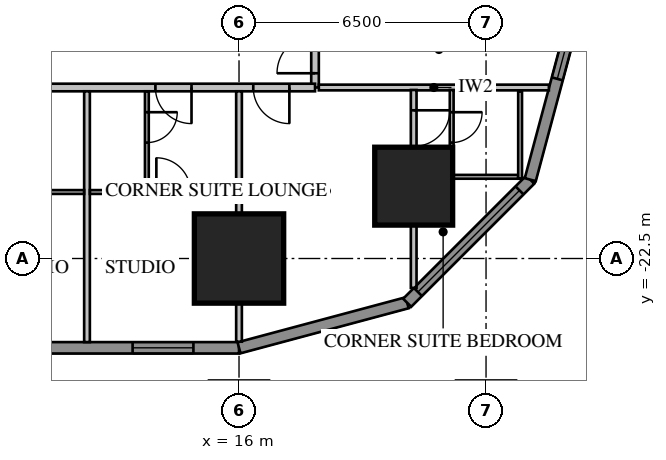
"""IFC4 building model, lengths in metres.
Left out: names, types, materials, properties, quantities, classifications, styles, units other than length and angle.
Written with IfcOpenShell. Run it as: python <this file> out.ifc"""

import sys

from ifc_helpers import new_model, si_unit, direction, frame, frame_2d, origin, origin_2d, place, context, subcontext, project, spatial, rectangle, extrude, element, fill, save


model = new_model("IFC4")
c1 = context("Model", 3, precision=1e-05, world=origin(), true_north=direction((0.0, 1.0)))
c2 = subcontext(c1, "Body", "Model", "MODEL_VIEW")
j1 = project(units=[si_unit("LENGTHUNIT", "METRE"), si_unit("PLANEANGLEUNIT", "RADIAN")], contexts=[c1])
p1 = place(None, origin())
s1 = spatial("IfcSite", under=j1, at=p1, CompositionType="ELEMENT")
p2 = place(p1, origin())
s2 = spatial("IfcBuilding", under=s1, at=p2, CompositionType="ELEMENT")
p3 = place(p2, frame((0.0, 0.0, 19.85)))
s3 = spatial("IfcBuildingStorey", under=s2, at=p3, CompositionType="ELEMENT", Elevation=19.85)
p4 = place(p3, frame((16.0, -22.5, 0.0), z_axis=(0.0, 0.0, 1.0), x_axis=(1.0, 0.0, 0.0)))
e1 = element("IfcColumn", 1, at=p4, inside=s3, PredefinedType="COLUMN", context=c2, shape_type="SweptSolid", body=[
    extrude(rectangle(XDim=2.35, YDim=2.35, at=origin_2d()), origin(), (0.0, 0.0, 1.0), 3.85),
])
p5 = place(p3, frame((20.596, -20.596, 0.0), z_axis=(0.0, 0.0, 1.0), x_axis=(1.0, 0.0, 0.0)))
e2 = element("IfcColumn", 2, at=p5, inside=s3, PredefinedType="COLUMN", context=c2, shape_type="SweptSolid", body=[
    extrude(rectangle(XDim=2.05, YDim=2.05, at=origin_2d()), origin(), (0.0, 0.0, 1.0), 3.85),
])
p6 = place(p3, frame((-16.0, -24.85, 0.0), z_axis=(0.0, 0.0, 1.0), x_axis=(1.0, 0.0, 0.0)))
e3 = element("IfcWall", 3, at=p6, inside=s3, PredefinedType="SOLIDWALL", context=c2, shape_type="SweptSolid", body=[
    extrude(rectangle(XDim=32.0, YDim=0.3, at=frame_2d((16.0, 0.0))), origin(), (0.0, 0.0, 1.0), 3.65),
])
p7 = place(p6, frame((1.2, 0.0, 0.75)))
e4 = element("IfcOpeningElement", 4, at=p7, cuts=e3, PredefinedType="OPENING", context=c2, shape_type="SweptSolid", body=[
    extrude(rectangle(XDim=1.6, YDim=1.8, at=frame_2d((0.8, 0.9))), frame((0.0, 0.17, 0.0), z_axis=(0.0, -1.0, 0.0), x_axis=(1.0, 0.0, 0.0)), (0.0, 0.0, 1.0), 0.34),
])
p8 = place(p6, frame((5.2, 0.0, 0.75)))
e5 = element("IfcOpeningElement", 5, at=p8, cuts=e3, PredefinedType="OPENING", context=c2, shape_type="SweptSolid", body=[
    extrude(rectangle(XDim=1.6, YDim=1.8, at=frame_2d((0.8, 0.9))), frame((0.0, 0.17, 0.0), z_axis=(0.0, -1.0, 0.0), x_axis=(1.0, 0.0, 0.0)), (0.0, 0.0, 1.0), 0.34),
])
p9 = place(p6, frame((17.2, 0.0, 0.75)))
e6 = element("IfcOpeningElement", 6, at=p9, cuts=e3, PredefinedType="OPENING", context=c2, shape_type="SweptSolid", body=[
    extrude(rectangle(XDim=1.6, YDim=1.8, at=frame_2d((0.8, 0.9))), frame((0.0, 0.17, 0.0), z_axis=(0.0, -1.0, 0.0), x_axis=(1.0, 0.0, 0.0)), (0.0, 0.0, 1.0), 0.34),
])
p10 = place(p6, frame((21.2, 0.0, 0.75)))
e7 = element("IfcOpeningElement", 7, at=p10, cuts=e3, PredefinedType="OPENING", context=c2, shape_type="SweptSolid", body=[
    extrude(rectangle(XDim=1.6, YDim=1.8, at=frame_2d((0.8, 0.9))), frame((0.0, 0.17, 0.0), z_axis=(0.0, -1.0, 0.0), x_axis=(1.0, 0.0, 0.0)), (0.0, 0.0, 1.0), 0.34),
])
p11 = place(p6, frame((25.2, 0.0, 0.75)))
e8 = element("IfcOpeningElement", 8, at=p11, cuts=e3, PredefinedType="OPENING", context=c2, shape_type="SweptSolid", body=[
    extrude(rectangle(XDim=1.6, YDim=1.8, at=frame_2d((0.8, 0.9))), frame((0.0, 0.17, 0.0), z_axis=(0.0, -1.0, 0.0), x_axis=(1.0, 0.0, 0.0)), (0.0, 0.0, 1.0), 0.34),
])
p12 = place(p6, frame((29.2, 0.0, 0.75)))
e9 = element("IfcOpeningElement", 9, at=p12, cuts=e3, PredefinedType="OPENING", context=c2, shape_type="SweptSolid", body=[
    extrude(rectangle(XDim=1.6, YDim=1.8, at=frame_2d((0.8, 0.9))), frame((0.0, 0.17, 0.0), z_axis=(0.0, -1.0, 0.0), x_axis=(1.0, 0.0, 0.0)), (0.0, 0.0, 1.0), 0.34),
])
p13 = place(p6, frame((8.8, 0.0, 0.75)))
e10 = element("IfcOpeningElement", 10, at=p13, cuts=e3, PredefinedType="OPENING", context=c2, shape_type="SweptSolid", body=[
    extrude(rectangle(XDim=2.4, YDim=1.8, at=frame_2d((1.2, 0.9))), frame((0.0, 0.17, 0.0), z_axis=(0.0, -1.0, 0.0), x_axis=(1.0, 0.0, 0.0)), (0.0, 0.0, 1.0), 0.34),
])
p14 = place(p6, frame((13.812, 0.0, 0.0)))
e11 = element("IfcOpeningElement", 11, at=p14, cuts=e3, PredefinedType="OPENING", context=c2, shape_type="SweptSolid", body=[
    extrude(rectangle(XDim=1.0, YDim=2.4, at=frame_2d((0.5, 1.2))), frame((0.0, 0.17, 0.0), z_axis=(0.0, -1.0, 0.0), x_axis=(1.0, 0.0, 0.0)), (0.0, 0.0, 1.0), 0.34),
])
p15 = place(p3, frame((16.0, -24.85, 0.0), z_axis=(0.0, 0.0, 1.0), x_axis=(0.965920218567, 0.258839972501, 0.0)))
e12 = element("IfcWall", 12, at=p15, inside=s3, PredefinedType="SOLIDWALL", context=c2, shape_type="SweptSolid", body=[
    extrude(rectangle(XDim=4.581, YDim=0.3, at=frame_2d((2.291, 0.0))), origin(), (0.0, 0.0, 1.0), 3.65),
])
p16 = place(p3, frame((20.425, -23.664, 0.0), z_axis=(0.0, 0.0, 1.0), x_axis=(0.707106781187, 0.707106781187, 0.0)))
e13 = element("IfcWall", 13, at=p16, inside=s3, PredefinedType="SOLIDWALL", context=c2, shape_type="SweptSolid", body=[
    extrude(rectangle(XDim=4.581, YDim=0.3, at=frame_2d((2.291, 0.0))), origin(), (0.0, 0.0, 1.0), 3.65),
])
p17 = place(p16, frame((0.4, 0.0, 0.75)))
e14 = element("IfcOpeningElement", 14, at=p17, cuts=e13, PredefinedType="OPENING", context=c2, shape_type="SweptSolid", body=[
    extrude(rectangle(XDim=3.781, YDim=1.8, at=frame_2d((1.891, 0.9))), frame((0.0, 0.17, 0.0), z_axis=(0.0, -1.0, 0.0), x_axis=(1.0, 0.0, 0.0)), (0.0, 0.0, 1.0), 0.34),
])
p18 = place(p3, frame((23.664, -20.425, 0.0), z_axis=(0.0, 0.0, 1.0), x_axis=(0.258839972501, 0.965920218567, 0.0)))
e15 = element("IfcWall", 15, at=p18, inside=s3, PredefinedType="SOLIDWALL", context=c2, shape_type="SweptSolid", body=[
    extrude(rectangle(XDim=4.581, YDim=0.3, at=frame_2d((2.291, 0.0))), origin(), (0.0, 0.0, 1.0), 3.65),
])
p19 = place(p18, frame((2.746, 0.0, 0.75)))
e16 = element("IfcOpeningElement", 16, at=p19, cuts=e15, PredefinedType="OPENING", context=c2, shape_type="SweptSolid", body=[
    extrude(rectangle(XDim=1.6, YDim=1.8, at=frame_2d((0.8, 0.9))), frame((0.0, 0.17, 0.0), z_axis=(0.0, -1.0, 0.0), x_axis=(1.0, 0.0, 0.0)), (0.0, 0.0, 1.0), 0.34),
])
p20 = place(p3, frame((18.0, -18.0, 0.0), z_axis=(0.0, 0.0, 1.0), x_axis=(0.0, 1.0, 0.0)))
e17 = element("IfcWall", 17, at=p20, inside=s3, PredefinedType="PARTITIONING", context=c2, shape_type="SweptSolid", body=[
    extrude(rectangle(XDim=36.0, YDim=0.2, at=frame_2d((18.0, 0.0))), origin(), (0.0, 0.0, 1.0), 3.65),
])
p21 = place(p20, frame((10.4, 0.0, 0.0)))
e18 = element("IfcOpeningElement", 18, at=p21, cuts=e17, PredefinedType="OPENING", context=c2, shape_type="SweptSolid", body=[
    extrude(rectangle(XDim=1.0, YDim=2.1, at=frame_2d((0.5, 1.05))), frame((0.0, 0.12, 0.0), z_axis=(0.0, -1.0, 0.0), x_axis=(1.0, 0.0, 0.0)), (0.0, 0.0, 1.0), 0.24),
])
p22 = place(p20, frame((0.375, 0.0, 0.0)))
e19 = element("IfcOpeningElement", 19, at=p22, cuts=e17, PredefinedType="OPENING", context=c2, shape_type="SweptSolid", body=[
    extrude(rectangle(XDim=1.0, YDim=2.1, at=frame_2d((0.5, 1.05))), frame((0.0, 0.12, 0.0), z_axis=(0.0, -1.0, 0.0), x_axis=(1.0, 0.0, 0.0)), (0.0, 0.0, 1.0), 0.24),
])
p23 = place(p20, frame((34.375, 0.0, 0.0)))
e20 = element("IfcOpeningElement", 20, at=p23, cuts=e17, PredefinedType="OPENING", context=c2, shape_type="SweptSolid", body=[
    extrude(rectangle(XDim=0.95, YDim=2.1, at=frame_2d((0.475, 1.05))), frame((0.0, 0.12, 0.0), z_axis=(0.0, -1.0, 0.0), x_axis=(1.0, 0.0, 0.0)), (0.0, 0.0, 1.0), 0.24),
])
p24 = place(p3, frame((18.1, -18.0, 0.0), z_axis=(0.0, 0.0, 1.0), x_axis=(1.0, 0.0, 0.0)))
e21 = element("IfcWall", 21, at=p24, inside=s3, PredefinedType="PARTITIONING", context=c2, shape_type="SweptSolid", body=[
    extrude(rectangle(XDim=6.053, YDim=0.15, at=frame_2d((3.027, 0.0))), origin(), (0.0, 0.0, 1.0), 3.65),
])
p25 = place(p3, frame((-18.0, -18.0, 0.0), z_axis=(0.0, 0.0, 1.0), x_axis=(1.0, 0.0, 0.0)))
e22 = element("IfcWall", 22, at=p25, inside=s3, PredefinedType="PARTITIONING", context=c2, shape_type="SweptSolid", body=[
    extrude(rectangle(XDim=36.0, YDim=0.2, at=frame_2d((18.0, 0.0))), origin(), (0.0, 0.0, 1.0), 3.65),
])
p26 = place(p25, frame((0.375, 0.0, 0.0)))
e23 = element("IfcOpeningElement", 23, at=p26, cuts=e22, PredefinedType="OPENING", context=c2, shape_type="SweptSolid", body=[
    extrude(rectangle(XDim=1.0, YDim=2.1, at=frame_2d((0.5, 1.05))), frame((0.0, 0.12, 0.0), z_axis=(0.0, -1.0, 0.0), x_axis=(1.0, 0.0, 0.0)), (0.0, 0.0, 1.0), 0.24),
])
p27 = place(p25, frame((2.45, 0.0, 0.0)))
e24 = element("IfcOpeningElement", 24, at=p27, cuts=e22, PredefinedType="OPENING", context=c2, shape_type="SweptSolid", body=[
    extrude(rectangle(XDim=0.8, YDim=2.1, at=frame_2d((0.4, 1.05))), frame((0.0, 0.12, 0.0), z_axis=(0.0, -1.0, 0.0), x_axis=(1.0, 0.0, 0.0)), (0.0, 0.0, 1.0), 0.24),
])
p28 = place(p25, frame((4.05, 0.0, 0.0)))
e25 = element("IfcOpeningElement", 25, at=p28, cuts=e22, PredefinedType="OPENING", context=c2, shape_type="SweptSolid", body=[
    extrude(rectangle(XDim=1.0, YDim=2.1, at=frame_2d((0.5, 1.05))), frame((0.0, 0.12, 0.0), z_axis=(0.0, -1.0, 0.0), x_axis=(1.0, 0.0, 0.0)), (0.0, 0.0, 1.0), 0.24),
])
p29 = place(p25, frame((6.45, 0.0, 0.0)))
e26 = element("IfcOpeningElement", 26, at=p29, cuts=e22, PredefinedType="OPENING", context=c2, shape_type="SweptSolid", body=[
    extrude(rectangle(XDim=0.9, YDim=2.1, at=frame_2d((0.45, 1.05))), frame((0.0, 0.12, 0.0), z_axis=(0.0, -1.0, 0.0), x_axis=(1.0, 0.0, 0.0)), (0.0, 0.0, 1.0), 0.24),
])
p30 = place(p25, frame((8.15, 0.0, 0.0)))
e27 = element("IfcOpeningElement", 27, at=p30, cuts=e22, PredefinedType="OPENING", context=c2, shape_type="SweptSolid", body=[
    extrude(rectangle(XDim=1.0, YDim=2.1, at=frame_2d((0.5, 1.05))), frame((0.0, 0.12, 0.0), z_axis=(0.0, -1.0, 0.0), x_axis=(1.0, 0.0, 0.0)), (0.0, 0.0, 1.0), 0.24),
])
p31 = place(p25, frame((19.8, 0.0, 0.0)))
e28 = element("IfcOpeningElement", 28, at=p31, cuts=e22, PredefinedType="OPENING", context=c2, shape_type="SweptSolid", body=[
    extrude(rectangle(XDim=0.95, YDim=2.1, at=frame_2d((0.475, 1.05))), frame((0.0, 0.12, 0.0), z_axis=(0.0, -1.0, 0.0), x_axis=(1.0, 0.0, 0.0)), (0.0, 0.0, 1.0), 0.24),
])
p32 = place(p25, frame((23.8, 0.0, 0.0)))
e29 = element("IfcOpeningElement", 29, at=p32, cuts=e22, PredefinedType="OPENING", context=c2, shape_type="SweptSolid", body=[
    extrude(rectangle(XDim=0.95, YDim=2.1, at=frame_2d((0.475, 1.05))), frame((0.0, 0.12, 0.0), z_axis=(0.0, -1.0, 0.0), x_axis=(1.0, 0.0, 0.0)), (0.0, 0.0, 1.0), 0.24),
])
p33 = place(p25, frame((27.8, 0.0, 0.0)))
e30 = element("IfcOpeningElement", 30, at=p33, cuts=e22, PredefinedType="OPENING", context=c2, shape_type="SweptSolid", body=[
    extrude(rectangle(XDim=0.95, YDim=2.1, at=frame_2d((0.475, 1.05))), frame((0.0, 0.12, 0.0), z_axis=(0.0, -1.0, 0.0), x_axis=(1.0, 0.0, 0.0)), (0.0, 0.0, 1.0), 0.24),
])
p34 = place(p25, frame((31.8, 0.0, 0.0)))
e31 = element("IfcOpeningElement", 31, at=p34, cuts=e22, PredefinedType="OPENING", context=c2, shape_type="SweptSolid", body=[
    extrude(rectangle(XDim=0.95, YDim=2.1, at=frame_2d((0.475, 1.05))), frame((0.0, 0.12, 0.0), z_axis=(0.0, -1.0, 0.0), x_axis=(1.0, 0.0, 0.0)), (0.0, 0.0, 1.0), 0.24),
])
p35 = place(p25, frame((34.375, 0.0, 0.0)))
e32 = element("IfcOpeningElement", 32, at=p35, cuts=e22, PredefinedType="OPENING", context=c2, shape_type="SweptSolid", body=[
    extrude(rectangle(XDim=0.95, YDim=2.1, at=frame_2d((0.475, 1.05))), frame((0.0, 0.12, 0.0), z_axis=(0.0, -1.0, 0.0), x_axis=(1.0, 0.0, 0.0)), (0.0, 0.0, 1.0), 0.24),
])
p36 = place(p25, frame((11.2, 0.0, 0.0)))
e33 = element("IfcOpeningElement", 33, at=p36, cuts=e22, PredefinedType="OPENING", context=c2, shape_type="SweptSolid", body=[
    extrude(rectangle(XDim=1.0, YDim=2.1, at=frame_2d((0.5, 1.05))), frame((0.0, 0.12, 0.0), z_axis=(0.0, -1.0, 0.0), x_axis=(1.0, 0.0, 0.0)), (0.0, 0.0, 1.0), 0.24),
])
p37 = place(p3, frame((12.0, -18.1, 0.0), z_axis=(0.0, 0.0, 1.0), x_axis=(0.0, -1.0, 0.0)))
e34 = element("IfcWall", 34, at=p37, inside=s3, PredefinedType="PARTITIONING", context=c2, shape_type="SweptSolid", body=[
    extrude(rectangle(XDim=6.6, YDim=0.15, at=frame_2d((3.3, 0.0))), origin(), (0.0, 0.0, 1.0), 3.65),
])
p38 = place(p3, frame((16.0, -18.1, 0.0), z_axis=(0.0, 0.0, 1.0), x_axis=(0.0, -1.0, 0.0)))
e35 = element("IfcWall", 35, at=p38, inside=s3, PredefinedType="PARTITIONING", context=c2, shape_type="SweptSolid", body=[
    extrude(rectangle(XDim=6.589, YDim=0.15, at=frame_2d((3.295, 0.0))), origin(), (0.0, 0.0, 1.0), 3.65),
])
p39 = place(p3, frame((13.575, -18.1, 0.0), z_axis=(0.0, 0.0, 1.0), x_axis=(0.0, -1.0, 0.0)))
e36 = element("IfcWall", 36, at=p39, inside=s3, PredefinedType="PARTITIONING", context=c2, shape_type="SweptSolid", body=[
    extrude(rectangle(XDim=2.7, YDim=0.1, at=frame_2d((1.35, 0.0))), origin(), (0.0, 0.0, 1.0), 3.65),
])
p40 = place(p39, frame((0.55, 0.0, 0.0)))
e37 = element("IfcOpeningElement", 37, at=p40, cuts=e36, PredefinedType="OPENING", context=c2, shape_type="SweptSolid", body=[
    extrude(rectangle(XDim=0.8, YDim=2.1, at=frame_2d((0.4, 1.05))), frame((0.0, 0.07, 0.0), z_axis=(0.0, -1.0, 0.0), x_axis=(1.0, 0.0, 0.0)), (0.0, 0.0, 1.0), 0.14),
])
p41 = place(p3, frame((12.075, -20.75, 0.0), z_axis=(0.0, 0.0, 1.0), x_axis=(1.0, 0.0, 0.0)))
e38 = element("IfcWall", 38, at=p41, inside=s3, PredefinedType="PARTITIONING", context=c2, shape_type="SweptSolid", body=[
    extrude(rectangle(XDim=1.45, YDim=0.1, at=frame_2d((0.725, 0.0))), origin(), (0.0, 0.0, 1.0), 3.65),
])
p42 = place(p3, frame((21.596, -18.065, 0.0), z_axis=(0.0, 0.0, 1.0), x_axis=(0.0, -1.0, 0.0)))
e39 = element("IfcWall", 39, at=p42, inside=s3, PredefinedType="PARTITIONING", context=c2, shape_type="SweptSolid", body=[
    extrude(rectangle(XDim=2.335, YDim=0.1, at=frame_2d((1.167, 0.0))), origin(), (0.0, 0.0, 1.0), 3.65),
])
p43 = place(p42, frame((0.585, 0.0, 0.0)))
e40 = element("IfcOpeningElement", 40, at=p43, cuts=e39, PredefinedType="OPENING", context=c2, shape_type="SweptSolid", body=[
    extrude(rectangle(XDim=0.8, YDim=2.1, at=frame_2d((0.4, 1.05))), frame((0.0, 0.07, 0.0), z_axis=(0.0, -1.0, 0.0), x_axis=(1.0, 0.0, 0.0)), (0.0, 0.0, 1.0), 0.14),
])
p44 = place(p3, frame((21.646, -20.35, 0.0), z_axis=(0.0, 0.0, 1.0), x_axis=(1.0, 0.0, 0.0)))
e41 = element("IfcWall", 41, at=p44, inside=s3, PredefinedType="PARTITIONING", context=c2, shape_type="SweptSolid", body=[
    extrude(rectangle(XDim=1.7, YDim=0.1, at=frame_2d((0.85, 0.0))), origin(), (0.0, 0.0, 1.0), 3.65),
])
p45 = place(p3, frame((23.396, -18.1, 0.0), z_axis=(0.0, 0.0, 1.0), x_axis=(0.0, -1.0, 0.0)))
e42 = element("IfcWall", 42, at=p45, inside=s3, PredefinedType="PARTITIONING", context=c2, shape_type="SweptSolid", body=[
    extrude(rectangle(XDim=2.3, YDim=0.1, at=frame_2d((1.15, 0.0))), origin(), (0.0, 0.0, 1.0), 3.65),
])
p46 = place(p3, frame((20.596, -18.065, 0.0), z_axis=(0.0, 0.0, 1.0), x_axis=(0.0, -1.0, 0.0)))
e43 = element("IfcWall", 43, at=p46, inside=s3, PredefinedType="PARTITIONING", context=c2, shape_type="SweptSolid", body=[
    extrude(rectangle(XDim=5.209, YDim=0.15, at=frame_2d((2.604, 0.0))), origin(), (0.0, 0.0, 1.0), 3.65),
])
p47 = place(p46, frame((0.535, 0.0, 0.0)))
e44 = element("IfcOpeningElement", 44, at=p47, cuts=e43, PredefinedType="OPENING", context=c2, shape_type="SweptSolid", body=[
    extrude(rectangle(XDim=0.95, YDim=2.1, at=frame_2d((0.475, 1.05))), frame((0.0, 0.095, 0.0), z_axis=(0.0, -1.0, 0.0), x_axis=(1.0, 0.0, 0.0)), (0.0, 0.0, 1.0), 0.19),
])
p48 = place(p3, frame((9.625, -20.75, 0.0), z_axis=(0.0, 0.0, 1.0), x_axis=(1.0, 0.0, 0.0)))
e45 = element("IfcWall", 45, at=p48, inside=s3, PredefinedType="PARTITIONING", context=c2, shape_type="SweptSolid", body=[
    extrude(rectangle(XDim=2.3, YDim=0.1, at=frame_2d((1.15, 0.0))), origin(), (0.0, 0.0, 1.0), 3.65),
])
p49 = place(p48, frame((0.2, 0.0, 0.0)))
e46 = element("IfcOpeningElement", 46, at=p49, cuts=e45, PredefinedType="OPENING", context=c2, shape_type="SweptSolid", body=[
    extrude(rectangle(XDim=0.9, YDim=2.1, at=frame_2d((0.45, 1.05))), frame((0.0, 0.07, 0.0), z_axis=(0.0, -1.0, 0.0), x_axis=(1.0, 0.0, 0.0)), (0.0, 0.0, 1.0), 0.14),
])
p50 = place(p3, frame((13.625, -20.75, 0.0), z_axis=(0.0, 0.0, 1.0), x_axis=(1.0, 0.0, 0.0)))
e47 = element("IfcWall", 47, at=p50, inside=s3, PredefinedType="PARTITIONING", context=c2, shape_type="SweptSolid", body=[
    extrude(rectangle(XDim=2.3, YDim=0.1, at=frame_2d((1.15, 0.0))), origin(), (0.0, 0.0, 1.0), 3.65),
])
p51 = place(p50, frame((0.2, 0.0, 0.0)))
e48 = element("IfcOpeningElement", 48, at=p51, cuts=e47, PredefinedType="OPENING", context=c2, shape_type="SweptSolid", body=[
    extrude(rectangle(XDim=0.9, YDim=2.1, at=frame_2d((0.45, 1.05))), frame((0.0, 0.07, 0.0), z_axis=(0.0, -1.0, 0.0), x_axis=(1.0, 0.0, 0.0)), (0.0, 0.0, 1.0), 0.14),
])
p52 = place(p19, origin())
e49 = element("IfcWindow", 49, at=p52, inside=s3, PartitioningType="SINGLE_PANEL", PredefinedType="WINDOW", context=c2, shape_type="SweptSolid", body=[
    extrude(rectangle(XDim=1.6, YDim=1.8, at=frame_2d((0.8, 0.9))), frame((0.0, 0.03, 0.0), z_axis=(0.0, -1.0, 0.0), x_axis=(1.0, 0.0, 0.0)), (0.0, 0.0, 1.0), 0.06),
])
fill(e16, e49)
p53 = place(p12, origin())
e50 = element("IfcWindow", 50, at=p53, inside=s3, PartitioningType="SINGLE_PANEL", PredefinedType="WINDOW", context=c2, shape_type="SweptSolid", body=[
    extrude(rectangle(XDim=1.6, YDim=1.8, at=frame_2d((0.8, 0.9))), frame((0.0, 0.03, 0.0), z_axis=(0.0, -1.0, 0.0), x_axis=(1.0, 0.0, 0.0)), (0.0, 0.0, 1.0), 0.06),
])
fill(e9, e50)
p54 = place(p17, origin())
e51 = element("IfcWindow", 51, at=p54, inside=s3, PartitioningType="SINGLE_PANEL", PredefinedType="WINDOW", context=c2, shape_type="SweptSolid", body=[
    extrude(rectangle(XDim=3.781, YDim=1.8, at=frame_2d((1.891, 0.9))), frame((0.0, 0.03, 0.0), z_axis=(0.0, -1.0, 0.0), x_axis=(1.0, 0.0, 0.0)), (0.0, 0.0, 1.0), 0.06),
])
fill(e14, e51)
p55 = place(p22, origin())
e52 = element("IfcDoor", 52, at=p55, inside=s3, OperationType="SINGLE_SWING_LEFT", PredefinedType="DOOR", context=c2, shape_type="SweptSolid", body=[
    extrude(rectangle(XDim=1.0, YDim=2.1, at=frame_2d((0.5, 1.05))), frame((0.0, 0.025, 0.0), z_axis=(0.0, -1.0, 0.0), x_axis=(1.0, 0.0, 0.0)), (0.0, 0.0, 1.0), 0.05),
])
fill(e19, e52)
p56 = place(p34, origin())
e53 = element("IfcDoor", 53, at=p56, inside=s3, OperationType="SINGLE_SWING_RIGHT", PredefinedType="DOOR", context=c2, shape_type="SweptSolid", body=[
    extrude(rectangle(XDim=0.95, YDim=2.1, at=frame_2d((0.475, 1.05))), frame((0.0, 0.025, 0.0), z_axis=(0.0, -1.0, 0.0), x_axis=(1.0, 0.0, 0.0)), (0.0, 0.0, 1.0), 0.05),
])
fill(e31, e53)
p57 = place(p40, origin())
e54 = element("IfcDoor", 54, at=p57, inside=s3, OperationType="SINGLE_SWING_LEFT", PredefinedType="DOOR", context=c2, shape_type="SweptSolid", body=[
    extrude(rectangle(XDim=0.8, YDim=2.1, at=frame_2d((0.4, 1.05))), frame((0.0, 0.025, 0.0), z_axis=(0.0, -1.0, 0.0), x_axis=(1.0, 0.0, 0.0)), (0.0, 0.0, 1.0), 0.05),
])
fill(e37, e54)
p58 = place(p35, origin())
e55 = element("IfcDoor", 55, at=p58, inside=s3, OperationType="SINGLE_SWING_RIGHT", PredefinedType="DOOR", context=c2, shape_type="SweptSolid", body=[
    extrude(rectangle(XDim=0.95, YDim=2.1, at=frame_2d((0.475, 1.05))), frame((0.0, 0.025, 0.0), z_axis=(0.0, -1.0, 0.0), x_axis=(1.0, 0.0, 0.0)), (0.0, 0.0, 1.0), 0.05),
])
fill(e32, e55)
p59 = place(p43, origin())
e56 = element("IfcDoor", 56, at=p59, inside=s3, OperationType="SINGLE_SWING_LEFT", PredefinedType="DOOR", context=c2, shape_type="SweptSolid", body=[
    extrude(rectangle(XDim=0.8, YDim=2.1, at=frame_2d((0.4, 1.05))), frame((0.0, 0.025, 0.0), z_axis=(0.0, -1.0, 0.0), x_axis=(1.0, 0.0, 0.0)), (0.0, 0.0, 1.0), 0.05),
])
fill(e40, e56)
p60 = place(p47, origin())
e57 = element("IfcDoor", 57, at=p60, inside=s3, OperationType="SINGLE_SWING_LEFT", PredefinedType="DOOR", context=c2, shape_type="SweptSolid", body=[
    extrude(rectangle(XDim=0.95, YDim=2.1, at=frame_2d((0.475, 1.05))), frame((0.0, 0.025, 0.0), z_axis=(0.0, -1.0, 0.0), x_axis=(1.0, 0.0, 0.0)), (0.0, 0.0, 1.0), 0.05),
])
fill(e44, e57)
p61 = place(p51, origin())
e58 = element("IfcDoor", 58, at=p61, inside=s3, OperationType="SINGLE_SWING_LEFT", PredefinedType="DOOR", context=c2, shape_type="SweptSolid", body=[
    extrude(rectangle(XDim=0.9, YDim=2.1, at=frame_2d((0.45, 1.05))), frame((0.0, 0.025, 0.0), z_axis=(0.0, -1.0, 0.0), x_axis=(1.0, 0.0, 0.0)), (0.0, 0.0, 1.0), 0.05),
])
fill(e48, e58)
save(model, sys.argv[1])
